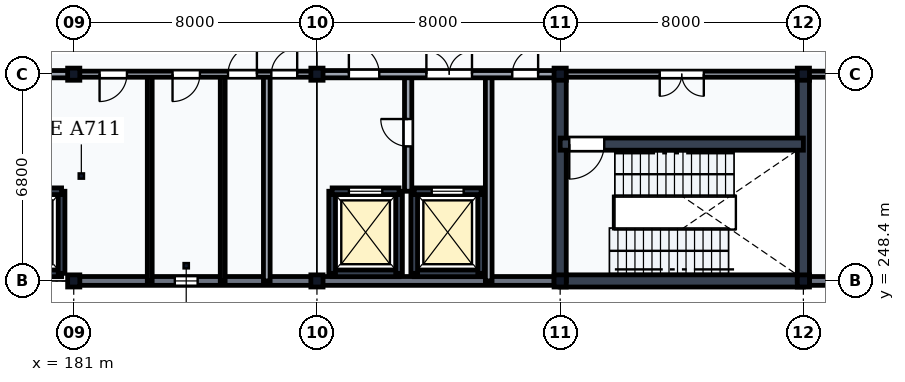
"""IFC4 building model, lengths in metres.
Left out: names, types, materials, properties, quantities, classifications, styles, units other than length and angle.
Written with IfcOpenShell. Run it as: python <this file> out.ifc"""

import sys

from ifc_helpers import new_model, si_unit, direction, frame, frame_2d, origin, origin_2d, place, context, subcontext, project, spatial, rectangle, i_section, extrude, element, fill, save


model = new_model("IFC4")
c1 = context("Model", 3, precision=1e-05, world=origin(), true_north=direction((0.0, 1.0)))
c2 = subcontext(c1, "Body", "Model", "MODEL_VIEW")
j1 = project(units=[si_unit("LENGTHUNIT", "METRE"), si_unit("PLANEANGLEUNIT", "RADIAN")], contexts=[c1])
p1 = place(None, origin())
s1 = spatial("IfcSite", under=j1, at=p1, CompositionType="ELEMENT")
p2 = place(p1, origin())
s2 = spatial("IfcBuilding", under=s1, at=p2, CompositionType="ELEMENT")
p3 = place(p2, frame((0.0, 0.0, 5.4)))
s3 = spatial("IfcBuildingStorey", under=s2, at=p3, CompositionType="ELEMENT", Elevation=5.4)
for number, where, z_axis, x_axis in (
    (1, (181.0, 248.4, 0.0), (0.0, 0.0, 1.0), (1.0, 0.0, 0.0)),
    (2, (181.0, 255.2, 0.0), (0.0, 0.0, 1.0), (1.0, 0.0, 0.0)),
    (3, (189.0, 248.4, 0.0), (0.0, 0.0, 1.0), (1.0, 0.0, 0.0)),
    (4, (189.0, 255.2, 0.0), (0.0, 0.0, 1.0), (1.0, 0.0, 0.0)),
    (5, (197.0, 248.4, 0.0), (0.0, 0.0, 1.0), (1.0, 0.0, 0.0)),
    (6, (197.0, 255.2, 0.0), (0.0, 0.0, 1.0), (1.0, 0.0, 0.0)),
    (7, (205.0, 248.4, 0.0), (0.0, 0.0, 1.0), (1.0, 0.0, 0.0)),
    (8, (205.0, 255.2, 0.0), (0.0, 0.0, 1.0), (1.0, 0.0, 0.0)),
):
    element("IfcColumn", number, at=place(p3, frame(where, z_axis=z_axis, x_axis=x_axis)), inside=s3, PredefinedType="COLUMN", context=c2, shape_type="SweptSolid", body=[
        extrude(i_section(OverallWidth=0.412, OverallDepth=0.435, WebThickness=0.036, FlangeThickness=0.057, FilletRadius=0.015, at=origin_2d()), origin(), (0.0, 0.0, 1.0), 5.1),
    ])
p4 = place(p3, frame((181.006, 248.4, 0.0), z_axis=(0.0, 0.0, 1.0), x_axis=(1.0, 0.0, 0.0)))
e9 = element("IfcWall", 9, at=p4, inside=s3, PredefinedType="SOLIDWALL", context=c2, shape_type="SweptSolid", body=[
    extrude(rectangle(XDim=7.988, YDim=0.29, at=frame_2d((3.994, 0.0))), origin(), (0.0, 0.0, 1.0), 4.548),
])
p5 = place(p4, frame((3.319, 0.0, 0.85)))
e10 = element("IfcOpeningElement", 10, at=p5, cuts=e9, PredefinedType="OPENING", context=c2, shape_type="SweptSolid", body=[
    extrude(rectangle(XDim=0.75, YDim=2.0, at=frame_2d((0.375, 1.0))), frame((0.0, 0.16, 0.0), z_axis=(0.0, -1.0, 0.0), x_axis=(1.0, 0.0, 0.0)), (0.0, 0.0, 1.0), 0.32),
])
p6 = place(p3, frame((189.006, 248.4, 0.0), z_axis=(0.0, 0.0, 1.0), x_axis=(1.0, 0.0, 0.0)))
e11 = element("IfcWall", 11, at=p6, inside=s3, PredefinedType="SOLIDWALL", context=c2, shape_type="SweptSolid", body=[
    extrude(rectangle(XDim=7.988, YDim=0.29, at=frame_2d((3.994, 0.0))), origin(), (0.0, 0.0, 1.0), 4.548),
])
p7 = place(p3, frame((205.006, 248.4, 0.0), z_axis=(0.0, 0.0, 1.0), x_axis=(1.0, 0.0, 0.0)))
e12 = element("IfcWall", 12, at=p7, inside=s3, PredefinedType="SOLIDWALL", context=c2, shape_type="SweptSolid", body=[
    extrude(rectangle(XDim=7.988, YDim=0.29, at=frame_2d((3.994, 0.0))), origin(), (0.0, 0.0, 1.0), 4.548),
])
p8 = place(p7, frame((3.244, 0.0, 0.95)))
e13 = element("IfcOpeningElement", 13, at=p8, cuts=e12, PredefinedType="OPENING", context=c2, shape_type="SweptSolid", body=[
    extrude(rectangle(XDim=1.5, YDim=1.9, at=frame_2d((0.75, 0.95))), frame((0.0, 0.16, 0.0), z_axis=(0.0, -1.0, 0.0), x_axis=(1.0, 0.0, 0.0)), (0.0, 0.0, 1.0), 0.32),
])
p9 = place(p3, frame((197.0, 248.4, 0.0), z_axis=(0.0, 0.0, 1.0), x_axis=(1.0, 0.0, 0.0)))
e14 = element("IfcWall", 14, at=p9, inside=s3, PredefinedType="SHEAR", context=c2, shape_type="SweptSolid", body=[
    extrude(rectangle(XDim=8.0, YDim=0.4, at=frame_2d((4.0, 0.0))), origin(), (0.0, 0.0, 1.0), 4.86),
])
for number, where, z_axis, x_axis in (
    (15, (197.0, 248.4, 0.0), (0.0, 0.0, 1.0), (0.0, 1.0, 0.0)),
    (16, (205.0, 248.4, 0.0), (0.0, 0.0, 1.0), (0.0, 1.0, 0.0)),
):
    element("IfcWall", number, at=place(p3, frame(where, z_axis=z_axis, x_axis=x_axis)), inside=s3, PredefinedType="SHEAR", context=c2, shape_type="SweptSolid", body=[
        extrude(rectangle(XDim=6.8, YDim=0.4, at=frame_2d((3.4, 0.0))), origin(), (0.0, 0.0, 1.0), 4.86),
    ])
p10 = place(p3, frame((197.0, 252.9, 0.0), z_axis=(0.0, 0.0, 1.0), x_axis=(1.0, 0.0, 0.0)))
e17 = element("IfcWall", 17, at=p10, inside=s3, PredefinedType="SHEAR", context=c2, shape_type="SweptSolid", body=[
    extrude(rectangle(XDim=8.0, YDim=0.4, at=frame_2d((4.0, 0.0))), origin(), (0.0, 0.0, 1.0), 4.86),
])
p11 = place(p10, frame((0.3, 0.0, 0.0)))
e18 = element("IfcOpeningElement", 18, at=p11, cuts=e17, PredefinedType="OPENING", context=c2, shape_type="SweptSolid", body=[
    extrude(rectangle(XDim=1.15, YDim=2.15, at=frame_2d((0.575, 1.075))), frame((0.0, 0.215, 0.0), z_axis=(0.0, -1.0, 0.0), x_axis=(1.0, 0.0, 0.0)), (0.0, 0.0, 1.0), 0.43),
])
p12 = place(p3, frame((197.0, 255.2, 0.0), z_axis=(0.0, 0.0, 1.0), x_axis=(1.0, 0.0, 0.0)))
e19 = element("IfcWall", 19, at=p12, inside=s3, PredefinedType="PARTITIONING", context=c2, shape_type="SweptSolid", body=[
    extrude(rectangle(XDim=8.0, YDim=0.2, at=frame_2d((4.0, 0.0))), origin(), (0.0, 0.0, 1.0), 4.358),
])
p13 = place(p12, frame((3.275, 0.0, 0.0)))
e20 = element("IfcOpeningElement", 20, at=p13, cuts=e19, PredefinedType="OPENING", context=c2, shape_type="SweptSolid", body=[
    extrude(rectangle(XDim=1.45, YDim=2.2, at=frame_2d((0.725, 1.1))), frame((0.0, 0.115, 0.0), z_axis=(0.0, -1.0, 0.0), x_axis=(1.0, 0.0, 0.0)), (0.0, 0.0, 1.0), 0.23),
])
p14 = place(p3, frame((178.4, 248.65, 0.0), z_axis=(0.0, 0.0, 1.0), x_axis=(1.0, 0.0, 0.0)))
e21 = element("IfcWall", 21, at=p14, inside=s3, PredefinedType="SHEAR", context=c2, shape_type="SweptSolid", body=[
    extrude(rectangle(XDim=2.2, YDim=0.22, at=frame_2d((1.1, 0.0))), origin(), (0.0, 0.0, 1.0), 4.86),
])
p15 = place(p3, frame((180.6, 248.65, 0.0), z_axis=(0.0, 0.0, 1.0), x_axis=(0.0, 1.0, 0.0)))
e22 = element("IfcWall", 22, at=p15, inside=s3, PredefinedType="SHEAR", context=c2, shape_type="SweptSolid", body=[
    extrude(rectangle(XDim=2.7, YDim=0.22, at=frame_2d((1.35, 0.0))), origin(), (0.0, 0.0, 1.0), 4.86),
])
p16 = place(p3, frame((178.4, 251.35, 0.0), z_axis=(0.0, 0.0, 1.0), x_axis=(1.0, 0.0, 0.0)))
e23 = element("IfcWall", 23, at=p16, inside=s3, PredefinedType="SHEAR", context=c2, shape_type="SweptSolid", body=[
    extrude(rectangle(XDim=2.2, YDim=0.22, at=frame_2d((1.1, 0.0))), origin(), (0.0, 0.0, 1.0), 4.86),
])
p17 = place(p16, frame((0.575, 0.0, 0.0)))
e24 = element("IfcOpeningElement", 24, at=p17, cuts=e23, PredefinedType="OPENING", context=c2, shape_type="SweptSolid", body=[
    extrude(rectangle(XDim=1.05, YDim=2.15, at=frame_2d((0.525, 1.075))), frame((0.0, 0.125, 0.0), z_axis=(0.0, -1.0, 0.0), x_axis=(1.0, 0.0, 0.0)), (0.0, 0.0, 1.0), 0.25),
])
p18 = place(p3, frame((189.5, 248.65, 0.0), z_axis=(0.0, 0.0, 1.0), x_axis=(1.0, 0.0, 0.0)))
e25 = element("IfcWall", 25, at=p18, inside=s3, PredefinedType="SHEAR", context=c2, shape_type="SweptSolid", body=[
    extrude(rectangle(XDim=2.2, YDim=0.22, at=frame_2d((1.1, 0.0))), origin(), (0.0, 0.0, 1.0), 4.86),
])
for number, where, z_axis, x_axis in (
    (26, (189.5, 248.65, 0.0), (0.0, 0.0, 1.0), (0.0, 1.0, 0.0)),
    (27, (191.7, 248.65, 0.0), (0.0, 0.0, 1.0), (0.0, 1.0, 0.0)),
):
    element("IfcWall", number, at=place(p3, frame(where, z_axis=z_axis, x_axis=x_axis)), inside=s3, PredefinedType="SHEAR", context=c2, shape_type="SweptSolid", body=[
        extrude(rectangle(XDim=2.7, YDim=0.22, at=frame_2d((1.35, 0.0))), origin(), (0.0, 0.0, 1.0), 4.86),
    ])
p19 = place(p3, frame((189.5, 251.35, 0.0), z_axis=(0.0, 0.0, 1.0), x_axis=(1.0, 0.0, 0.0)))
e28 = element("IfcWall", 28, at=p19, inside=s3, PredefinedType="SHEAR", context=c2, shape_type="SweptSolid", body=[
    extrude(rectangle(XDim=2.2, YDim=0.22, at=frame_2d((1.1, 0.0))), origin(), (0.0, 0.0, 1.0), 4.86),
])
p20 = place(p19, frame((0.55, 0.0, 0.0)))
e29 = element("IfcOpeningElement", 29, at=p20, cuts=e28, PredefinedType="OPENING", context=c2, shape_type="SweptSolid", body=[
    extrude(rectangle(XDim=1.1, YDim=2.15, at=frame_2d((0.55, 1.075))), frame((0.0, 0.125, 0.0), z_axis=(0.0, -1.0, 0.0), x_axis=(1.0, 0.0, 0.0)), (0.0, 0.0, 1.0), 0.25),
])
p21 = place(p3, frame((192.2, 248.65, 0.0), z_axis=(0.0, 0.0, 1.0), x_axis=(1.0, 0.0, 0.0)))
e30 = element("IfcWall", 30, at=p21, inside=s3, PredefinedType="SHEAR", context=c2, shape_type="SweptSolid", body=[
    extrude(rectangle(XDim=2.2, YDim=0.22, at=frame_2d((1.1, 0.0))), origin(), (0.0, 0.0, 1.0), 4.86),
])
for number, where, z_axis, x_axis in (
    (31, (192.2, 248.65, 0.0), (0.0, 0.0, 1.0), (0.0, 1.0, 0.0)),
    (32, (194.4, 248.65, 0.0), (0.0, 0.0, 1.0), (0.0, 1.0, 0.0)),
):
    element("IfcWall", number, at=place(p3, frame(where, z_axis=z_axis, x_axis=x_axis)), inside=s3, PredefinedType="SHEAR", context=c2, shape_type="SweptSolid", body=[
        extrude(rectangle(XDim=2.7, YDim=0.22, at=frame_2d((1.35, 0.0))), origin(), (0.0, 0.0, 1.0), 4.86),
    ])
p22 = place(p3, frame((192.2, 251.35, 0.0), z_axis=(0.0, 0.0, 1.0), x_axis=(1.0, 0.0, 0.0)))
e33 = element("IfcWall", 33, at=p22, inside=s3, PredefinedType="SHEAR", context=c2, shape_type="SweptSolid", body=[
    extrude(rectangle(XDim=2.2, YDim=0.22, at=frame_2d((1.1, 0.0))), origin(), (0.0, 0.0, 1.0), 4.86),
])
p23 = place(p22, frame((0.575, 0.0, 0.0)))
e34 = element("IfcOpeningElement", 34, at=p23, cuts=e33, PredefinedType="OPENING", context=c2, shape_type="SweptSolid", body=[
    extrude(rectangle(XDim=1.05, YDim=2.15, at=frame_2d((0.525, 1.075))), frame((0.0, 0.125, 0.0), z_axis=(0.0, -1.0, 0.0), x_axis=(1.0, 0.0, 0.0)), (0.0, 0.0, 1.0), 0.25),
])
p24 = place(p3, frame((192.0, 251.35, 0.0), z_axis=(0.0, 0.0, 1.0), x_axis=(0.0, 1.0, 0.0)))
e35 = element("IfcWall", 35, at=p24, inside=s3, PredefinedType="PARTITIONING", context=c2, shape_type="SweptSolid", body=[
    extrude(rectangle(XDim=3.85, YDim=0.24, at=frame_2d((1.925, 0.0))), origin(), (0.0, 0.0, 1.0), 4.86),
])
p25 = place(p24, frame((1.475, 0.0, 0.0)))
e36 = element("IfcOpeningElement", 36, at=p25, cuts=e35, PredefinedType="OPENING", context=c2, shape_type="SweptSolid", body=[
    extrude(rectangle(XDim=0.9, YDim=2.1, at=frame_2d((0.45, 1.05))), frame((0.0, 0.135, 0.0), z_axis=(0.0, -1.0, 0.0), x_axis=(1.0, 0.0, 0.0)), (0.0, 0.0, 1.0), 0.27),
])
p26 = place(p3, frame((194.65, 248.4, 0.0), z_axis=(0.0, 0.0, 1.0), x_axis=(0.0, 1.0, 0.0)))
e37 = element("IfcWall", 37, at=p26, inside=s3, PredefinedType="PARTITIONING", context=c2, shape_type="SweptSolid", body=[
    extrude(rectangle(XDim=6.8, YDim=0.22, at=frame_2d((3.4, 0.0))), origin(), (0.0, 0.0, 1.0), 4.86),
])
for number, where, z_axis, x_axis in (
    (38, (183.5, 248.4, 0.0), (0.0, 0.0, 1.0), (0.0, 1.0, 0.0)),
    (39, (185.9, 248.4, 0.0), (0.0, 0.0, 1.0), (0.0, 1.0, 0.0)),
):
    element("IfcWall", number, at=place(p3, frame(where, z_axis=z_axis, x_axis=x_axis)), inside=s3, PredefinedType="PARTITIONING", context=c2, shape_type="SweptSolid", body=[
        extrude(rectangle(XDim=6.8, YDim=0.16, at=frame_2d((3.4, 0.0))), origin(), (0.0, 0.0, 1.0), 4.86),
    ])
p27 = place(p3, frame((187.35, 248.4, 0.0), z_axis=(0.0, 0.0, 1.0), x_axis=(0.0, 1.0, 0.0)))
e40 = element("IfcWall", 40, at=p27, inside=s3, PredefinedType="PARTITIONING", context=c2, shape_type="SweptSolid", body=[
    extrude(rectangle(XDim=6.8, YDim=0.22, at=frame_2d((3.4, 0.0))), origin(), (0.0, 0.0, 1.0), 4.86),
])
p28 = place(p3, frame((173.0, 255.2, 0.0), z_axis=(0.0, 0.0, 1.0), x_axis=(1.0, 0.0, 0.0)))
e41 = element("IfcWall", 41, at=p28, inside=s3, PredefinedType="PARTITIONING", context=c2, shape_type="SweptSolid", body=[
    extrude(rectangle(XDim=8.0, YDim=0.24, at=frame_2d((4.0, 0.0))), origin(), (0.0, 0.0, 1.0), 4.358),
])
p29 = place(p28, frame((1.05, 0.0, 0.0)))
e42 = element("IfcOpeningElement", 42, at=p29, cuts=e41, PredefinedType="OPENING", context=c2, shape_type="SweptSolid", body=[
    extrude(rectangle(XDim=1.0, YDim=2.1, at=frame_2d((0.5, 1.05))), frame((0.0, 0.135, 0.0), z_axis=(0.0, -1.0, 0.0), x_axis=(1.0, 0.0, 0.0)), (0.0, 0.0, 1.0), 0.27),
])
p30 = place(p28, frame((4.6, 0.0, 0.0)))
e43 = element("IfcOpeningElement", 43, at=p30, cuts=e41, PredefinedType="OPENING", context=c2, shape_type="SweptSolid", body=[
    extrude(rectangle(XDim=1.6, YDim=2.25, at=frame_2d((0.8, 1.125))), frame((0.0, 0.135, 0.0), z_axis=(0.0, -1.0, 0.0), x_axis=(1.0, 0.0, 0.0)), (0.0, 0.0, 1.0), 0.27),
])
p31 = place(p3, frame((181.0, 255.2, 0.0), z_axis=(0.0, 0.0, 1.0), x_axis=(1.0, 0.0, 0.0)))
e44 = element("IfcWall", 44, at=p31, inside=s3, PredefinedType="PARTITIONING", context=c2, shape_type="SweptSolid", body=[
    extrude(rectangle(XDim=8.0, YDim=0.2, at=frame_2d((4.0, 0.0))), origin(), (0.0, 0.0, 1.0), 4.358),
])
p32 = place(p31, frame((0.85, 0.0, 0.0)))
e45 = element("IfcOpeningElement", 45, at=p32, cuts=e44, PredefinedType="OPENING", context=c2, shape_type="SweptSolid", body=[
    extrude(rectangle(XDim=0.9, YDim=2.1, at=frame_2d((0.45, 1.05))), frame((0.0, 0.115, 0.0), z_axis=(0.0, -1.0, 0.0), x_axis=(1.0, 0.0, 0.0)), (0.0, 0.0, 1.0), 0.23),
])
p33 = place(p31, frame((3.25, 0.0, 0.0)))
e46 = element("IfcOpeningElement", 46, at=p33, cuts=e44, PredefinedType="OPENING", context=c2, shape_type="SweptSolid", body=[
    extrude(rectangle(XDim=0.9, YDim=2.1, at=frame_2d((0.45, 1.05))), frame((0.0, 0.115, 0.0), z_axis=(0.0, -1.0, 0.0), x_axis=(1.0, 0.0, 0.0)), (0.0, 0.0, 1.0), 0.23),
])
p34 = place(p31, frame((5.075, 0.0, 0.0)))
e47 = element("IfcOpeningElement", 47, at=p34, cuts=e44, PredefinedType="OPENING", context=c2, shape_type="SweptSolid", body=[
    extrude(rectangle(XDim=0.95, YDim=2.1, at=frame_2d((0.475, 1.05))), frame((0.0, 0.115, 0.0), z_axis=(0.0, -1.0, 0.0), x_axis=(1.0, 0.0, 0.0)), (0.0, 0.0, 1.0), 0.23),
])
p35 = place(p31, frame((6.5, 0.0, 0.0)))
e48 = element("IfcOpeningElement", 48, at=p35, cuts=e44, PredefinedType="OPENING", context=c2, shape_type="SweptSolid", body=[
    extrude(rectangle(XDim=0.85, YDim=2.1, at=frame_2d((0.425, 1.05))), frame((0.0, 0.115, 0.0), z_axis=(0.0, -1.0, 0.0), x_axis=(1.0, 0.0, 0.0)), (0.0, 0.0, 1.0), 0.23),
])
p36 = place(p3, frame((189.0, 255.2, 0.0), z_axis=(0.0, 0.0, 1.0), x_axis=(1.0, 0.0, 0.0)))
e49 = element("IfcWall", 49, at=p36, inside=s3, PredefinedType="PARTITIONING", context=c2, shape_type="SweptSolid", body=[
    extrude(rectangle(XDim=8.0, YDim=0.24, at=frame_2d((4.0, 0.0))), origin(), (0.0, 0.0, 1.0), 4.358),
])
p37 = place(p36, frame((1.05, 0.0, 0.0)))
e50 = element("IfcOpeningElement", 50, at=p37, cuts=e49, PredefinedType="OPENING", context=c2, shape_type="SweptSolid", body=[
    extrude(rectangle(XDim=1.0, YDim=2.1, at=frame_2d((0.5, 1.05))), frame((0.0, 0.135, 0.0), z_axis=(0.0, -1.0, 0.0), x_axis=(1.0, 0.0, 0.0)), (0.0, 0.0, 1.0), 0.27),
])
p38 = place(p36, frame((3.6, 0.0, 0.0)))
e51 = element("IfcOpeningElement", 51, at=p38, cuts=e49, PredefinedType="OPENING", context=c2, shape_type="SweptSolid", body=[
    extrude(rectangle(XDim=1.5, YDim=2.25, at=frame_2d((0.75, 1.125))), frame((0.0, 0.135, 0.0), z_axis=(0.0, -1.0, 0.0), x_axis=(1.0, 0.0, 0.0)), (0.0, 0.0, 1.0), 0.27),
])
p39 = place(p36, frame((6.425, 0.0, 0.0)))
e52 = element("IfcOpeningElement", 52, at=p39, cuts=e49, PredefinedType="OPENING", context=c2, shape_type="SweptSolid", body=[
    extrude(rectangle(XDim=0.85, YDim=2.1, at=frame_2d((0.425, 1.05))), frame((0.0, 0.135, 0.0), z_axis=(0.0, -1.0, 0.0), x_axis=(1.0, 0.0, 0.0)), (0.0, 0.0, 1.0), 0.27),
])
p40 = place(p3, frame((205.0, 255.2, 0.0), z_axis=(0.0, 0.0, 1.0), x_axis=(1.0, 0.0, 0.0)))
e53 = element("IfcWall", 53, at=p40, inside=s3, PredefinedType="PARTITIONING", context=c2, shape_type="SweptSolid", body=[
    extrude(rectangle(XDim=24.0, YDim=0.2, at=frame_2d((12.0, 0.0))), origin(), (0.0, 0.0, 1.0), 4.358),
])
p41 = place(p40, frame((5.5, 0.0, 0.0)))
e54 = element("IfcOpeningElement", 54, at=p41, cuts=e53, PredefinedType="OPENING", context=c2, shape_type="SweptSolid", body=[
    extrude(rectangle(XDim=1.0, YDim=2.1, at=frame_2d((0.5, 1.05))), frame((0.0, 0.115, 0.0), z_axis=(0.0, -1.0, 0.0), x_axis=(1.0, 0.0, 0.0)), (0.0, 0.0, 1.0), 0.23),
])
p42 = place(p40, frame((17.5, 0.0, 0.0)))
e55 = element("IfcOpeningElement", 55, at=p42, cuts=e53, PredefinedType="OPENING", context=c2, shape_type="SweptSolid", body=[
    extrude(rectangle(XDim=1.0, YDim=2.1, at=frame_2d((0.5, 1.05))), frame((0.0, 0.115, 0.0), z_axis=(0.0, -1.0, 0.0), x_axis=(1.0, 0.0, 0.0)), (0.0, 0.0, 1.0), 0.23),
])
p43 = place(p5, origin())
e56 = element("IfcWindow", 56, at=p43, inside=s3, PartitioningType="SINGLE_PANEL", PredefinedType="WINDOW", context=c2, shape_type="SweptSolid", body=[
    extrude(rectangle(XDim=0.75, YDim=2.0, at=frame_2d((0.375, 1.0))), frame((0.0, 0.03, 0.0), z_axis=(0.0, -1.0, 0.0), x_axis=(1.0, 0.0, 0.0)), (0.0, 0.0, 1.0), 0.06),
])
fill(e10, e56)
p44 = place(p11, frame((1.15, 0.0, 0.0), z_axis=(0.0, 0.0, 1.0), x_axis=(-1.0, 0.0, 0.0)))
e57 = element("IfcDoor", 57, at=p44, inside=s3, OperationType="SINGLE_SWING_RIGHT", PredefinedType="DOOR", context=c2, shape_type="SweptSolid", body=[
    extrude(rectangle(XDim=1.15, YDim=2.15, at=frame_2d((0.575, 1.075))), frame((0.0, 0.025, 0.0), z_axis=(0.0, -1.0, 0.0), x_axis=(1.0, 0.0, 0.0)), (0.0, 0.0, 1.0), 0.05),
])
fill(e18, e57)
p45 = place(p13, frame((1.45, 0.0, 0.0), z_axis=(0.0, 0.0, 1.0), x_axis=(-1.0, 0.0, 0.0)))
e58 = element("IfcDoor", 58, at=p45, inside=s3, OperationType="DOUBLE_DOOR_SINGLE_SWING", PredefinedType="DOOR", context=c2, shape_type="SweptSolid", body=[
    extrude(rectangle(XDim=1.45, YDim=2.2, at=frame_2d((0.725, 1.1))), frame((0.0, 0.025, 0.0), z_axis=(0.0, -1.0, 0.0), x_axis=(1.0, 0.0, 0.0)), (0.0, 0.0, 1.0), 0.05),
])
fill(e20, e58)
p46 = place(p20, origin())
e59 = element("IfcDoor", 59, at=p46, inside=s3, OperationType="DOUBLE_DOOR_SLIDING", PredefinedType="USERDEFINED", context=c2, shape_type="SweptSolid", body=[
    extrude(rectangle(XDim=1.1, YDim=2.15, at=frame_2d((0.55, 1.075))), frame((0.0, 0.025, 0.0), z_axis=(0.0, -1.0, 0.0), x_axis=(1.0, 0.0, 0.0)), (0.0, 0.0, 1.0), 0.05),
])
fill(e29, e59)
p47 = place(p23, origin())
e60 = element("IfcDoor", 60, at=p47, inside=s3, OperationType="DOUBLE_DOOR_SLIDING", PredefinedType="USERDEFINED", context=c2, shape_type="SweptSolid", body=[
    extrude(rectangle(XDim=1.05, YDim=2.15, at=frame_2d((0.525, 1.075))), frame((0.0, 0.025, 0.0), z_axis=(0.0, -1.0, 0.0), x_axis=(1.0, 0.0, 0.0)), (0.0, 0.0, 1.0), 0.05),
])
fill(e34, e60)
p48 = place(p25, origin())
e61 = element("IfcDoor", 61, at=p48, inside=s3, OperationType="SINGLE_SWING_LEFT", PredefinedType="DOOR", context=c2, shape_type="SweptSolid", body=[
    extrude(rectangle(XDim=0.9, YDim=2.1, at=frame_2d((0.45, 1.05))), frame((0.0, 0.025, 0.0), z_axis=(0.0, -1.0, 0.0), x_axis=(1.0, 0.0, 0.0)), (0.0, 0.0, 1.0), 0.05),
])
fill(e36, e61)
p49 = place(p32, frame((0.9, 0.0, 0.0), z_axis=(0.0, 0.0, 1.0), x_axis=(-1.0, 0.0, 0.0)))
e62 = element("IfcDoor", 62, at=p49, inside=s3, OperationType="SINGLE_SWING_RIGHT", PredefinedType="DOOR", context=c2, shape_type="SweptSolid", body=[
    extrude(rectangle(XDim=0.9, YDim=2.1, at=frame_2d((0.45, 1.05))), frame((0.0, 0.025, 0.0), z_axis=(0.0, -1.0, 0.0), x_axis=(1.0, 0.0, 0.0)), (0.0, 0.0, 1.0), 0.05),
])
fill(e45, e62)
p50 = place(p33, frame((0.9, 0.0, 0.0), z_axis=(0.0, 0.0, 1.0), x_axis=(-1.0, 0.0, 0.0)))
e63 = element("IfcDoor", 63, at=p50, inside=s3, OperationType="SINGLE_SWING_RIGHT", PredefinedType="DOOR", context=c2, shape_type="SweptSolid", body=[
    extrude(rectangle(XDim=0.9, YDim=2.1, at=frame_2d((0.45, 1.05))), frame((0.0, 0.025, 0.0), z_axis=(0.0, -1.0, 0.0), x_axis=(1.0, 0.0, 0.0)), (0.0, 0.0, 1.0), 0.05),
])
fill(e46, e63)
p51 = place(p34, frame((0.95, 0.0, 0.0), z_axis=(0.0, 0.0, 1.0), x_axis=(-1.0, 0.0, 0.0)))
e64 = element("IfcDoor", 64, at=p51, inside=s3, OperationType="SINGLE_SWING_LEFT", PredefinedType="DOOR", context=c2, shape_type="SweptSolid", body=[
    extrude(rectangle(XDim=0.95, YDim=2.1, at=frame_2d((0.475, 1.05))), frame((0.0, 0.025, 0.0), z_axis=(0.0, -1.0, 0.0), x_axis=(1.0, 0.0, 0.0)), (0.0, 0.0, 1.0), 0.05),
])
fill(e47, e64)
p52 = place(p35, frame((0.85, 0.0, 0.0), z_axis=(0.0, 0.0, 1.0), x_axis=(-1.0, 0.0, 0.0)))
e65 = element("IfcDoor", 65, at=p52, inside=s3, OperationType="SINGLE_SWING_LEFT", PredefinedType="DOOR", context=c2, shape_type="SweptSolid", body=[
    extrude(rectangle(XDim=0.85, YDim=2.1, at=frame_2d((0.425, 1.05))), frame((0.0, 0.025, 0.0), z_axis=(0.0, -1.0, 0.0), x_axis=(1.0, 0.0, 0.0)), (0.0, 0.0, 1.0), 0.05),
])
fill(e48, e65)
p53 = place(p37, frame((1.0, 0.0, 0.0), z_axis=(0.0, 0.0, 1.0), x_axis=(-1.0, 0.0, 0.0)))
e66 = element("IfcDoor", 66, at=p53, inside=s3, OperationType="SINGLE_SWING_RIGHT", PredefinedType="DOOR", context=c2, shape_type="SweptSolid", body=[
    extrude(rectangle(XDim=1.0, YDim=2.1, at=frame_2d((0.5, 1.05))), frame((0.0, 0.025, 0.0), z_axis=(0.0, -1.0, 0.0), x_axis=(1.0, 0.0, 0.0)), (0.0, 0.0, 1.0), 0.05),
])
fill(e50, e66)
p54 = place(p38, frame((1.5, 0.0, 0.0), z_axis=(0.0, 0.0, 1.0), x_axis=(-1.0, 0.0, 0.0)))
e67 = element("IfcDoor", 67, at=p54, inside=s3, OperationType="DOUBLE_DOOR_SINGLE_SWING", PredefinedType="DOOR", context=c2, shape_type="SweptSolid", body=[
    extrude(rectangle(XDim=1.5, YDim=2.25, at=frame_2d((0.75, 1.125))), frame((0.0, 0.025, 0.0), z_axis=(0.0, -1.0, 0.0), x_axis=(1.0, 0.0, 0.0)), (0.0, 0.0, 1.0), 0.05),
])
fill(e51, e67)
p55 = place(p39, frame((0.85, 0.0, 0.0), z_axis=(0.0, 0.0, 1.0), x_axis=(-1.0, 0.0, 0.0)))
e68 = element("IfcDoor", 68, at=p55, inside=s3, OperationType="SINGLE_SWING_LEFT", PredefinedType="DOOR", context=c2, shape_type="SweptSolid", body=[
    extrude(rectangle(XDim=0.85, YDim=2.1, at=frame_2d((0.425, 1.05))), frame((0.0, 0.025, 0.0), z_axis=(0.0, -1.0, 0.0), x_axis=(1.0, 0.0, 0.0)), (0.0, 0.0, 1.0), 0.05),
])
fill(e52, e68)
save(model, sys.argv[1])
